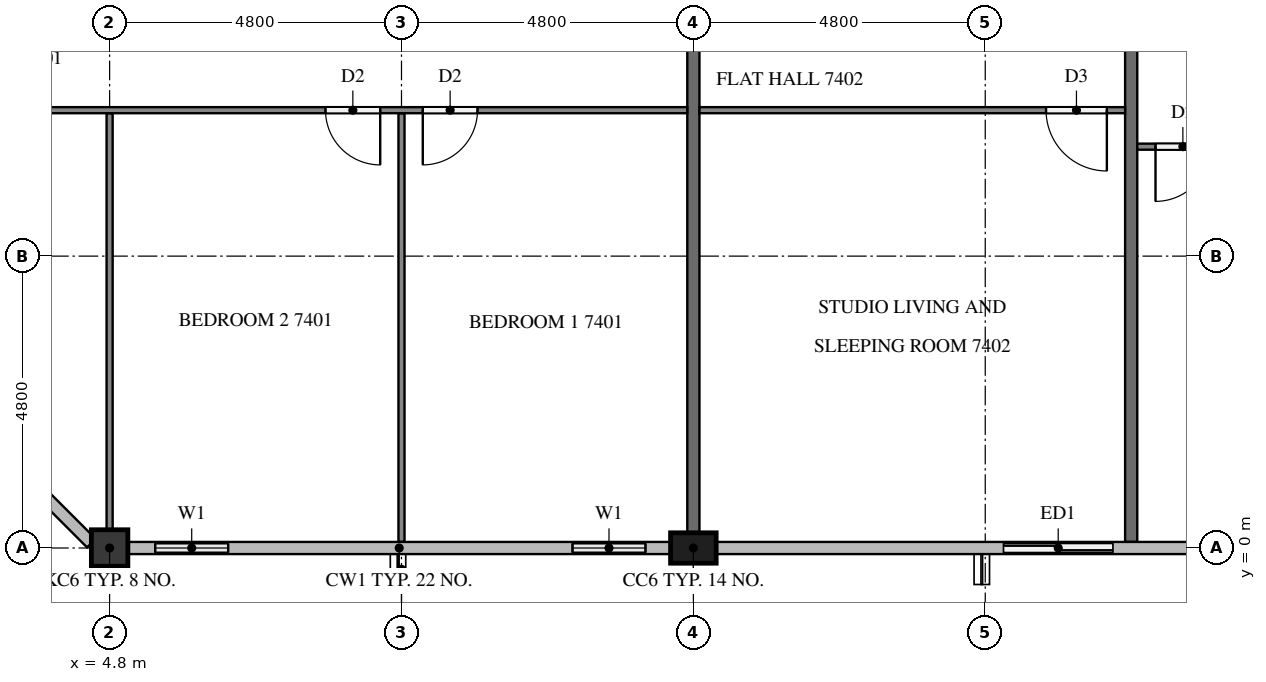
"""IFC4 building model, lengths in metres.
Left out: names, types, materials, properties, quantities, classifications, styles, units other than length and angle.
Written with IfcOpenShell. Run it as: python <this file> out.ifc"""

import sys

from ifc_helpers import new_model, si_unit, direction, frame, frame_2d, origin, origin_2d, place, context, subcontext, project, spatial, rectangle, extrude, element, fill, save


model = new_model("IFC4")
c1 = context("Model", 3, precision=1e-05, world=origin(), true_north=direction((0.0, 1.0)))
c2 = subcontext(c1, "Body", "Model", "MODEL_VIEW")
j1 = project(units=[si_unit("LENGTHUNIT", "METRE"), si_unit("PLANEANGLEUNIT", "RADIAN")], contexts=[c1])
p1 = place(None, origin())
s1 = spatial("IfcSite", under=j1, at=p1, CompositionType="ELEMENT")
p2 = place(p1, origin())
s2 = spatial("IfcBuilding", under=s1, at=p2, CompositionType="ELEMENT")
p3 = place(p2, frame((0.0, 0.0, 282.6)))
s3 = spatial("IfcBuildingStorey", under=s2, at=p3, CompositionType="ELEMENT", Elevation=282.6)
p4 = place(p3, frame((4.8, 0.0, 0.0), z_axis=(0.0, 0.0, 1.0), x_axis=(1.0, 0.0, 0.0)))
e1 = element("IfcColumn", 1, at=p4, inside=s3, PredefinedType="COLUMN", context=c2, shape_type="SweptSolid", body=[
    extrude(rectangle(XDim=0.6, YDim=0.6, at=origin_2d()), origin(), (0.0, 0.0, 1.0), 3.2),
])
p5 = place(p3, frame((14.4, 0.0, 0.0), z_axis=(0.0, 0.0, 1.0), x_axis=(1.0, 0.0, 0.0)))
e2 = element("IfcColumn", 2, at=p5, inside=s3, PredefinedType="COLUMN", context=c2, shape_type="SweptSolid", body=[
    extrude(rectangle(XDim=0.75, YDim=0.5, at=origin_2d()), origin(), (0.0, 0.0, 1.0), 3.2),
])
p6 = place(p3, frame((5.1, 0.0, 0.0), z_axis=(0.0, 0.0, 1.0), x_axis=(1.0, 0.0, 0.0)))
e3 = element("IfcWall", 3, at=p6, inside=s3, PredefinedType="SOLIDWALL", context=c2, shape_type="SweptSolid", body=[
    extrude(rectangle(XDim=2.1, YDim=0.15, at=frame_2d((1.05, 0.0))), origin(), (0.0, 0.0, 1.0), 3.2),
])
p7 = place(p6, frame((0.45, 0.0, 0.9)))
e4 = element("IfcOpeningElement", 4, at=p7, cuts=e3, PredefinedType="OPENING", context=c2, shape_type="SweptSolid", body=[
    extrude(rectangle(XDim=1.2, YDim=1.4, at=frame_2d((0.6, 0.7))), frame((0.0, 0.085, 0.0), z_axis=(0.0, -1.0, 0.0), x_axis=(1.0, 0.0, 0.0)), (0.0, 0.0, 1.0), 0.17),
])
p8 = place(p3, frame((12.0, 0.0, 0.0), z_axis=(0.0, 0.0, 1.0), x_axis=(1.0, 0.0, 0.0)))
e5 = element("IfcWall", 5, at=p8, inside=s3, PredefinedType="SOLIDWALL", context=c2, shape_type="SweptSolid", body=[
    extrude(rectangle(XDim=2.025, YDim=0.15, at=frame_2d((1.012, 0.0))), origin(), (0.0, 0.0, 1.0), 3.2),
])
p9 = place(p8, frame((0.413, 0.0, 0.9)))
e6 = element("IfcOpeningElement", 6, at=p9, cuts=e5, PredefinedType="OPENING", context=c2, shape_type="SweptSolid", body=[
    extrude(rectangle(XDim=1.2, YDim=1.4, at=frame_2d((0.6, 0.7))), frame((0.0, 0.085, 0.0), z_axis=(0.0, -1.0, 0.0), x_axis=(1.0, 0.0, 0.0)), (0.0, 0.0, 1.0), 0.17),
])
p10 = place(p3, frame((19.2, 0.0, 0.0), z_axis=(0.0, 0.0, 1.0), x_axis=(1.0, 0.0, 0.0)))
e7 = element("IfcWall", 7, at=p10, inside=s3, PredefinedType="SOLIDWALL", context=c2, shape_type="SweptSolid", body=[
    extrude(rectangle(XDim=2.4, YDim=0.15, at=frame_2d((1.2, 0.0))), origin(), (0.0, 0.0, 1.0), 3.2),
])
p11 = place(p10, frame((0.3, 0.0, 0.0)))
e8 = element("IfcOpeningElement", 8, at=p11, cuts=e7, PredefinedType="OPENING", context=c2, shape_type="SweptSolid", body=[
    extrude(rectangle(XDim=1.8, YDim=2.4, at=frame_2d((0.9, 1.2))), frame((0.0, 0.085, 0.0), z_axis=(0.0, -1.0, 0.0), x_axis=(1.0, 0.0, 0.0)), (0.0, 0.0, 1.0), 0.17),
])
p12 = place(p3, frame((14.4, 11.9, 0.0), z_axis=(0.0, 0.0, 1.0), x_axis=(0.0, -1.0, 0.0)))
e9 = element("IfcWall", 9, at=p12, inside=s3, PredefinedType="PARTITIONING", context=c2, shape_type="SweptSolid", body=[
    extrude(rectangle(XDim=11.65, YDim=0.2, at=frame_2d((5.825, 0.0))), origin(), (0.0, 0.0, 1.0), 3.2),
])
p13 = place(p3, frame((21.6, 11.9, 0.0), z_axis=(0.0, 0.0, 1.0), x_axis=(0.0, -1.0, 0.0)))
e10 = element("IfcWall", 10, at=p13, inside=s3, PredefinedType="PARTITIONING", context=c2, shape_type="SweptSolid", body=[
    extrude(rectangle(XDim=11.8, YDim=0.2, at=frame_2d((5.9, 0.0))), origin(), (0.0, 0.0, 1.0), 3.2),
])
p14 = place(p3, frame((9.6, 7.15, 0.0), z_axis=(0.0, 0.0, 1.0), x_axis=(0.0, -1.0, 0.0)))
e11 = element("IfcWall", 11, at=p14, inside=s3, PredefinedType="PARTITIONING", context=c2, shape_type="SweptSolid", body=[
    extrude(rectangle(XDim=7.05, YDim=0.1, at=frame_2d((3.525, 0.0))), origin(), (0.0, 0.0, 1.0), 3.2),
])
p15 = place(p3, frame((4.8, 7.15, 0.0), z_axis=(0.0, 0.0, 1.0), x_axis=(0.0, -1.0, 0.0)))
e12 = element("IfcWall", 12, at=p15, inside=s3, PredefinedType="PARTITIONING", context=c2, shape_type="SweptSolid", body=[
    extrude(rectangle(XDim=6.85, YDim=0.1, at=frame_2d((3.425, 0.0))), origin(), (0.0, 0.0, 1.0), 3.2),
])
p16 = place(p3, frame((14.3, 7.2, 0.0), z_axis=(0.0, 0.0, 1.0), x_axis=(-1.0, 0.0, 0.0)))
e13 = element("IfcWall", 13, at=p16, inside=s3, PredefinedType="PARTITIONING", context=c2, shape_type="SweptSolid", body=[
    extrude(rectangle(XDim=14.2, YDim=0.1, at=frame_2d((7.1, 0.0))), origin(), (0.0, 0.0, 1.0), 3.2),
])
p17 = place(p16, frame((3.45, 0.0, 0.0)))
e14 = element("IfcOpeningElement", 14, at=p17, cuts=e13, PredefinedType="OPENING", context=c2, shape_type="SweptSolid", body=[
    extrude(rectangle(XDim=0.9, YDim=2.1, at=frame_2d((0.45, 1.05))), frame((0.0, 0.06, 0.0), z_axis=(0.0, -1.0, 0.0), x_axis=(1.0, 0.0, 0.0)), (0.0, 0.0, 1.0), 0.12),
])
p18 = place(p16, frame((5.05, 0.0, 0.0)))
e15 = element("IfcOpeningElement", 15, at=p18, cuts=e13, PredefinedType="OPENING", context=c2, shape_type="SweptSolid", body=[
    extrude(rectangle(XDim=0.9, YDim=2.1, at=frame_2d((0.45, 1.05))), frame((0.0, 0.06, 0.0), z_axis=(0.0, -1.0, 0.0), x_axis=(1.0, 0.0, 0.0)), (0.0, 0.0, 1.0), 0.12),
])
p19 = place(p16, frame((12.9, 0.0, 0.0)))
e16 = element("IfcOpeningElement", 16, at=p19, cuts=e13, PredefinedType="OPENING", context=c2, shape_type="SweptSolid", body=[
    extrude(rectangle(XDim=1.0, YDim=2.1, at=frame_2d((0.5, 1.05))), frame((0.0, 0.06, 0.0), z_axis=(0.0, -1.0, 0.0), x_axis=(1.0, 0.0, 0.0)), (0.0, 0.0, 1.0), 0.12),
])
p20 = place(p3, frame((21.5, 7.2, 0.0), z_axis=(0.0, 0.0, 1.0), x_axis=(-1.0, 0.0, 0.0)))
e17 = element("IfcWall", 17, at=p20, inside=s3, PredefinedType="PARTITIONING", context=c2, shape_type="SweptSolid", body=[
    extrude(rectangle(XDim=7.0, YDim=0.1, at=frame_2d((3.5, 0.0))), origin(), (0.0, 0.0, 1.0), 3.2),
])
p21 = place(p20, frame((0.3, 0.0, 0.0)))
e18 = element("IfcOpeningElement", 18, at=p21, cuts=e17, PredefinedType="OPENING", context=c2, shape_type="SweptSolid", body=[
    extrude(rectangle(XDim=1.0, YDim=2.1, at=frame_2d((0.5, 1.05))), frame((0.0, 0.06, 0.0), z_axis=(0.0, -1.0, 0.0), x_axis=(1.0, 0.0, 0.0)), (0.0, 0.0, 1.0), 0.12),
])
p22 = place(p3, frame((35.9, 6.6, 0.0), z_axis=(0.0, 0.0, 1.0), x_axis=(-1.0, 0.0, 0.0)))
e19 = element("IfcWall", 19, at=p22, inside=s3, PredefinedType="PARTITIONING", context=c2, shape_type="SweptSolid", body=[
    extrude(rectangle(XDim=14.2, YDim=0.1, at=frame_2d((7.1, 0.0))), origin(), (0.0, 0.0, 1.0), 3.2),
])
p23 = place(p22, frame((13.0, 0.0, 0.0)))
e20 = element("IfcOpeningElement", 20, at=p23, cuts=e19, PredefinedType="OPENING", context=c2, shape_type="SweptSolid", body=[
    extrude(rectangle(XDim=0.9, YDim=2.1, at=frame_2d((0.45, 1.05))), frame((0.0, 0.06, 0.0), z_axis=(0.0, -1.0, 0.0), x_axis=(1.0, 0.0, 0.0)), (0.0, 0.0, 1.0), 0.12),
])
p24 = place(p22, frame((5.05, 0.0, 0.0)))
e21 = element("IfcOpeningElement", 21, at=p24, cuts=e19, PredefinedType="OPENING", context=c2, shape_type="SweptSolid", body=[
    extrude(rectangle(XDim=1.0, YDim=2.1, at=frame_2d((0.5, 1.05))), frame((0.0, 0.06, 0.0), z_axis=(0.0, -1.0, 0.0), x_axis=(1.0, 0.0, 0.0)), (0.0, 0.0, 1.0), 0.12),
])
p25 = place(p22, frame((3.45, 0.0, 0.0)))
e22 = element("IfcOpeningElement", 22, at=p25, cuts=e19, PredefinedType="OPENING", context=c2, shape_type="SweptSolid", body=[
    extrude(rectangle(XDim=0.9, YDim=2.1, at=frame_2d((0.45, 1.05))), frame((0.0, 0.06, 0.0), z_axis=(0.0, -1.0, 0.0), x_axis=(1.0, 0.0, 0.0)), (0.0, 0.0, 1.0), 0.12),
])
p26 = place(p7, origin())
e23 = element("IfcWindow", 23, at=p26, inside=s3, PartitioningType="SINGLE_PANEL", PredefinedType="WINDOW", context=c2, shape_type="SweptSolid", body=[
    extrude(rectangle(XDim=1.2, YDim=1.4, at=frame_2d((0.6, 0.7))), frame((0.0, 0.03, 0.0), z_axis=(0.0, -1.0, 0.0), x_axis=(1.0, 0.0, 0.0)), (0.0, 0.0, 1.0), 0.06),
])
fill(e4, e23)
p27 = place(p9, origin())
e24 = element("IfcWindow", 24, at=p27, inside=s3, PartitioningType="SINGLE_PANEL", PredefinedType="WINDOW", context=c2, shape_type="SweptSolid", body=[
    extrude(rectangle(XDim=1.2, YDim=1.4, at=frame_2d((0.6, 0.7))), frame((0.0, 0.03, 0.0), z_axis=(0.0, -1.0, 0.0), x_axis=(1.0, 0.0, 0.0)), (0.0, 0.0, 1.0), 0.06),
])
fill(e6, e24)
p28 = place(p11, origin())
e25 = element("IfcDoor", 25, at=p28, inside=s3, OperationType="SLIDING_TO_LEFT", PredefinedType="DOOR", context=c2, shape_type="SweptSolid", body=[
    extrude(rectangle(XDim=1.8, YDim=2.4, at=frame_2d((0.9, 1.2))), frame((0.0, 0.025, 0.0), z_axis=(0.0, -1.0, 0.0), x_axis=(1.0, 0.0, 0.0)), (0.0, 0.0, 1.0), 0.05),
])
fill(e8, e25)
p29 = place(p17, origin())
e26 = element("IfcDoor", 26, at=p29, inside=s3, OperationType="SINGLE_SWING_RIGHT", PredefinedType="DOOR", context=c2, shape_type="SweptSolid", body=[
    extrude(rectangle(XDim=0.9, YDim=2.1, at=frame_2d((0.45, 1.05))), frame((0.0, 0.025, 0.0), z_axis=(0.0, -1.0, 0.0), x_axis=(1.0, 0.0, 0.0)), (0.0, 0.0, 1.0), 0.05),
])
fill(e14, e26)
p30 = place(p18, origin())
e27 = element("IfcDoor", 27, at=p30, inside=s3, OperationType="SINGLE_SWING_LEFT", PredefinedType="DOOR", context=c2, shape_type="SweptSolid", body=[
    extrude(rectangle(XDim=0.9, YDim=2.1, at=frame_2d((0.45, 1.05))), frame((0.0, 0.025, 0.0), z_axis=(0.0, -1.0, 0.0), x_axis=(1.0, 0.0, 0.0)), (0.0, 0.0, 1.0), 0.05),
])
fill(e15, e27)
p31 = place(p21, origin())
e28 = element("IfcDoor", 28, at=p31, inside=s3, OperationType="SINGLE_SWING_LEFT", PredefinedType="DOOR", context=c2, shape_type="SweptSolid", body=[
    extrude(rectangle(XDim=1.0, YDim=2.1, at=frame_2d((0.5, 1.05))), frame((0.0, 0.025, 0.0), z_axis=(0.0, -1.0, 0.0), x_axis=(1.0, 0.0, 0.0)), (0.0, 0.0, 1.0), 0.05),
])
fill(e18, e28)
p32 = place(p23, origin())
e29 = element("IfcDoor", 29, at=p32, inside=s3, OperationType="SINGLE_SWING_RIGHT", PredefinedType="DOOR", context=c2, shape_type="SweptSolid", body=[
    extrude(rectangle(XDim=0.9, YDim=2.1, at=frame_2d((0.45, 1.05))), frame((0.0, 0.025, 0.0), z_axis=(0.0, -1.0, 0.0), x_axis=(1.0, 0.0, 0.0)), (0.0, 0.0, 1.0), 0.05),
])
fill(e20, e29)
save(model, sys.argv[1])
